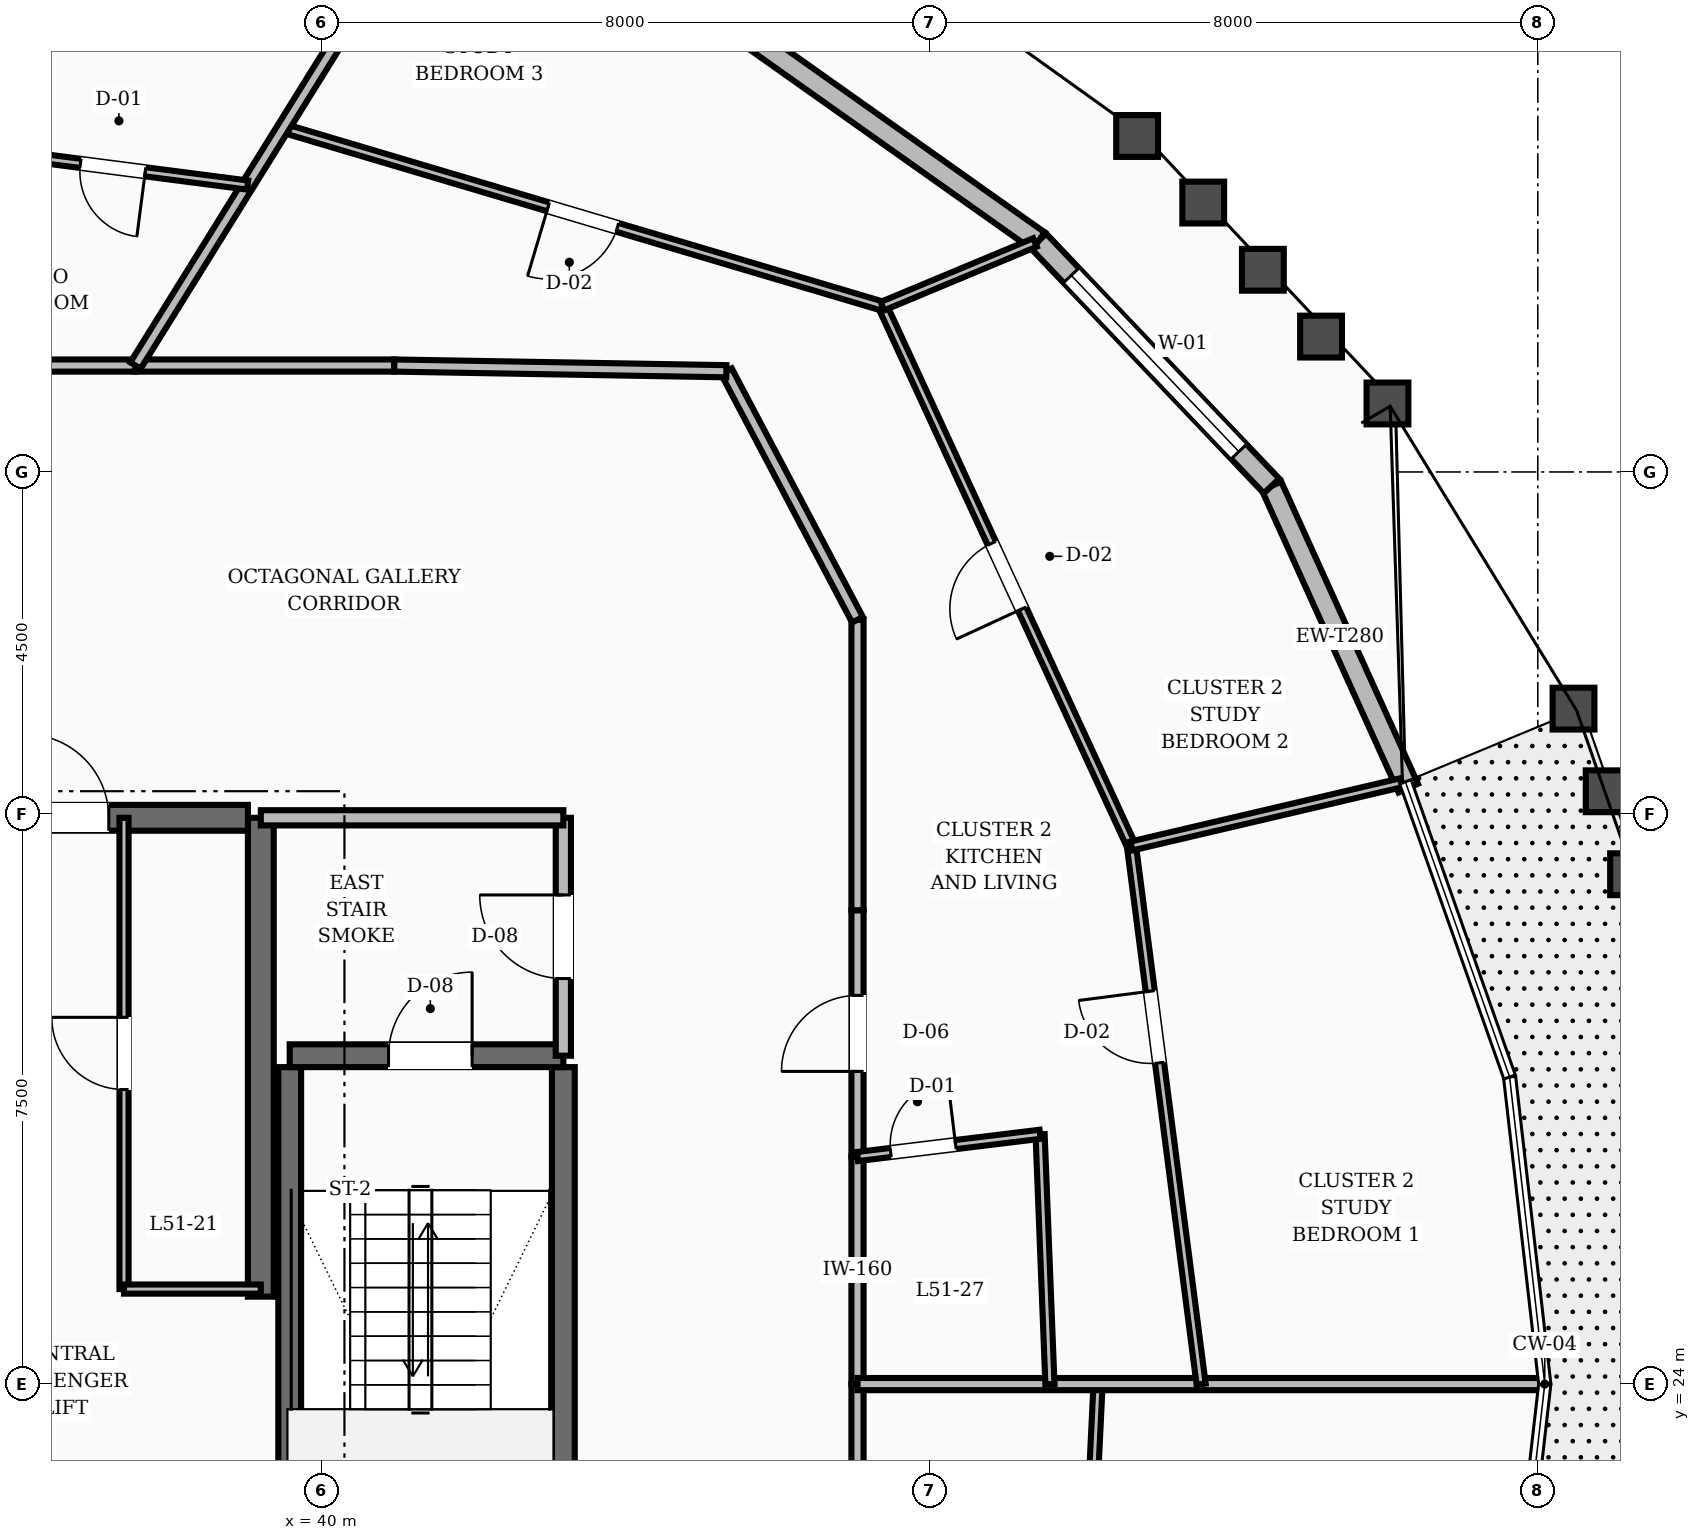
"""IFC4 building model, lengths in metres.
Left out: names, types, materials, properties, quantities, classifications, styles, units other than length and angle.
Written with IfcOpenShell. Run it as: python <this file> out.ifc"""

import sys

from ifc_helpers import new_model, si_unit, direction, frame, frame_2d, origin, place, context, subcontext, project, spatial, rectangle, extrude, element, fill, save


model = new_model("IFC4")
c1 = context("Model", 3, precision=1e-05, world=origin(), true_north=direction((0.0, 1.0)))
c2 = subcontext(c1, "Body", "Model", "MODEL_VIEW")
j1 = project(units=[si_unit("LENGTHUNIT", "METRE"), si_unit("PLANEANGLEUNIT", "RADIAN")], contexts=[c1])
p1 = place(None, origin())
s1 = spatial("IfcSite", under=j1, at=p1, CompositionType="ELEMENT")
p2 = place(p1, origin())
s2 = spatial("IfcBuilding", under=s1, at=p2, CompositionType="ELEMENT")
p3 = place(p2, frame((0.0, 0.0, 196.4)))
s3 = spatial("IfcBuildingStorey", under=s2, at=p3, CompositionType="ELEMENT", Elevation=196.4)
p4 = place(p3, frame((39.2, 25.15, 0.0), z_axis=(0.0, 0.0, 1.0), x_axis=(0.0, 1.0, 0.0)))
e1 = element("IfcWall", 1, at=p4, inside=s3, PredefinedType="SHEAR", context=c2, shape_type="SweptSolid", body=[
    extrude(rectangle(XDim=6.3, YDim=0.34, at=frame_2d((3.15, 0.0))), origin(), (0.0, 0.0, 1.0), 3.6),
])
p5 = place(p3, frame((35.8, 31.45, 0.0), z_axis=(0.0, 0.0, 1.0), x_axis=(1.0, 0.0, 0.0)))
e2 = element("IfcWall", 2, at=p5, inside=s3, PredefinedType="SHEAR", context=c2, shape_type="SweptSolid", body=[
    extrude(rectangle(XDim=3.23, YDim=0.34, at=frame_2d((1.615, 0.0))), origin(), (0.0, 0.0, 1.0), 3.6),
])
p6 = place(p5, frame((0.3, 0.0, 0.0)))
e3 = element("IfcOpeningElement", 3, at=p6, cuts=e2, PredefinedType="OPENING", context=c2, shape_type="SweptSolid", body=[
    extrude(rectangle(XDim=1.1, YDim=2.1, at=frame_2d((0.55, 1.05))), frame((0.0, 0.18, 0.0), z_axis=(0.0, -1.0, 0.0), x_axis=(1.0, 0.0, 0.0)), (0.0, 0.0, 1.0), 0.36),
])
for number, where, z_axis, x_axis in (
    (4, (43.18, 19.43, 0.0), (0.0, 0.0, 1.0), (0.0, 1.0, 0.0)),
    (5, (39.58, 19.43, 0.0), (0.0, 0.0, 1.0), (0.0, 1.0, 0.0)),
):
    element("IfcWall", number, at=place(p3, frame(where, z_axis=z_axis, x_axis=x_axis)), inside=s3, PredefinedType="SHEAR", context=c2, shape_type="SweptSolid", body=[
        extrude(rectangle(XDim=8.74, YDim=0.3, at=frame_2d((4.37, 0.0))), origin(), (0.0, 0.0, 1.0), 3.6),
    ])
p7 = place(p3, frame((39.58, 28.32, 0.0), z_axis=(0.0, 0.0, 1.0), x_axis=(1.0, 0.0, 0.0)))
e6 = element("IfcWall", 6, at=p7, inside=s3, PredefinedType="SHEAR", context=c2, shape_type="SweptSolid", body=[
    extrude(rectangle(XDim=3.6, YDim=0.3, at=frame_2d((1.8, 0.0))), origin(), (0.0, 0.0, 1.0), 3.6),
])
p8 = place(p7, frame((1.3, 0.0, 0.0)))
e7 = element("IfcOpeningElement", 7, at=p8, cuts=e6, PredefinedType="OPENING", context=c2, shape_type="SweptSolid", body=[
    extrude(rectangle(XDim=1.1, YDim=2.1, at=frame_2d((0.55, 1.05))), frame((0.0, 0.16, 0.0), z_axis=(0.0, -1.0, 0.0), x_axis=(1.0, 0.0, 0.0)), (0.0, 0.0, 1.0), 0.32),
])
p9 = place(p3, frame((54.296, 31.841, 0.0), z_axis=(0.0, 0.0, 1.0), x_axis=(-0.41225081931, 0.911070393536, 0.0)))
e8 = element("IfcWall", 8, at=p9, inside=s3, PredefinedType="STANDARD", context=c2, shape_type="SweptSolid", body=[
    extrude(rectangle(XDim=4.363, YDim=0.28, at=frame_2d((2.181, 0.0))), origin(), (0.0, 0.0, 1.0), 2.82),
])
p10 = place(p3, frame((52.497, 35.815, 0.0), z_axis=(0.0, 0.0, 1.0), x_axis=(-0.689241173538, 0.724531990115, 0.0)))
e9 = element("IfcWall", 9, at=p10, inside=s3, PredefinedType="STANDARD", context=c2, shape_type="SweptSolid", body=[
    extrude(rectangle(XDim=4.448, YDim=0.28, at=frame_2d((2.224, 0.0))), origin(), (0.0, 0.0, 1.0), 2.82),
])
p11 = place(p10, frame((0.624, 0.0, 0.8)))
e10 = element("IfcOpeningElement", 10, at=p11, cuts=e9, PredefinedType="OPENING", context=c2, shape_type="SweptSolid", body=[
    extrude(rectangle(XDim=3.2, YDim=1.65, at=frame_2d((1.6, 0.825))), frame((0.0, 0.15, 0.0), z_axis=(0.0, -1.0, 0.0), x_axis=(1.0, 0.0, 0.0)), (0.0, 0.0, 1.0), 0.3),
])
p12 = place(p3, frame((49.431, 39.038, 0.0), z_axis=(0.0, 0.0, 1.0), x_axis=(-0.81615549773, 0.577832331672, 0.0)))
e11 = element("IfcWall", 11, at=p12, inside=s3, PredefinedType="STANDARD", context=c2, shape_type="SweptSolid", body=[
    extrude(rectangle(XDim=4.577, YDim=0.28, at=frame_2d((2.289, 0.0))), origin(), (0.0, 0.0, 1.0), 2.82),
])
p13 = place(p3, frame((43.18, 28.32, 0.0), z_axis=(0.0, 0.0, 1.0), x_axis=(0.0, 1.0, 0.0)))
e12 = element("IfcWall", 12, at=p13, inside=s3, PredefinedType="SOLIDWALL", context=c2, shape_type="SweptSolid", body=[
    extrude(rectangle(XDim=3.13, YDim=0.2, at=frame_2d((1.565, 0.0))), origin(), (0.0, 0.0, 1.0), 2.8),
])
p14 = place(p13, frame((1.015, 0.0, 0.0)))
e13 = element("IfcOpeningElement", 13, at=p14, cuts=e12, PredefinedType="OPENING", context=c2, shape_type="SweptSolid", body=[
    extrude(rectangle(XDim=1.1, YDim=2.1, at=frame_2d((0.55, 1.05))), frame((0.0, 0.11, 0.0), z_axis=(0.0, -1.0, 0.0), x_axis=(1.0, 0.0, 0.0)), (0.0, 0.0, 1.0), 0.22),
])
p15 = place(p3, frame((39.2, 31.45, 0.0), z_axis=(0.0, 0.0, 1.0), x_axis=(1.0, 0.0, 0.0)))
e14 = element("IfcWall", 14, at=p15, inside=s3, PredefinedType="SOLIDWALL", context=c2, shape_type="SweptSolid", body=[
    extrude(rectangle(XDim=3.98, YDim=0.2, at=frame_2d((1.99, 0.0))), origin(), (0.0, 0.0, 1.0), 2.8),
])
p16 = place(p3, frame((37.4, 25.25, 0.0), z_axis=(0.0, 0.0, 1.0), x_axis=(0.0, 1.0, 0.0)))
e15 = element("IfcWall", 15, at=p16, inside=s3, PredefinedType="PARTITIONING", context=c2, shape_type="SweptSolid", body=[
    extrude(rectangle(XDim=6.2, YDim=0.12, at=frame_2d((3.1, 0.0))), origin(), (0.0, 0.0, 1.0), 2.8),
])
p17 = place(p16, frame((2.625, 0.0, 0.0)))
e16 = element("IfcOpeningElement", 16, at=p17, cuts=e15, PredefinedType="OPENING", context=c2, shape_type="SweptSolid", body=[
    extrude(rectangle(XDim=0.95, YDim=2.1, at=frame_2d((0.475, 1.05))), frame((0.0, 0.07, 0.0), z_axis=(0.0, -1.0, 0.0), x_axis=(1.0, 0.0, 0.0)), (0.0, 0.0, 1.0), 0.14),
])
p18 = place(p3, frame((37.4, 25.25, 0.0), z_axis=(0.0, 0.0, 1.0), x_axis=(1.0, 0.0, 0.0)))
e17 = element("IfcWall", 17, at=p18, inside=s3, PredefinedType="PARTITIONING", context=c2, shape_type="SweptSolid", body=[
    extrude(rectangle(XDim=1.8, YDim=0.12, at=frame_2d((0.9, 0.0))), origin(), (0.0, 0.0, 1.0), 2.8),
])
p19 = place(p3, frame((47.05, 24.0, 0.0), z_axis=(0.0, 0.0, 1.0), x_axis=(0.0, 1.0, 0.0)))
e18 = element("IfcWall", 18, at=p19, inside=s3, PredefinedType="SOLIDWALL", context=c2, shape_type="SweptSolid", body=[
    extrude(rectangle(XDim=2.994, YDim=0.16, at=frame_2d((1.497, 0.0))), origin(), (0.0, 0.0, 1.0), 2.8),
])
p20 = place(p3, frame((47.05, 26.994, 0.0), z_axis=(0.0, 0.0, 1.0), x_axis=(0.0, 1.0, 0.0)))
e19 = element("IfcWall", 19, at=p20, inside=s3, PredefinedType="SOLIDWALL", context=c2, shape_type="SweptSolid", body=[
    extrude(rectangle(XDim=3.24, YDim=0.16, at=frame_2d((1.62, 0.0))), origin(), (0.0, 0.0, 1.0), 2.8),
])
p21 = place(p20, frame((1.12, 0.0, 0.0)))
e20 = element("IfcOpeningElement", 20, at=p21, cuts=e19, PredefinedType="OPENING", context=c2, shape_type="SweptSolid", body=[
    extrude(rectangle(XDim=1.0, YDim=2.1, at=frame_2d((0.5, 1.05))), frame((0.0, 0.09, 0.0), z_axis=(0.0, -1.0, 0.0), x_axis=(1.0, 0.0, 0.0)), (0.0, 0.0, 1.0), 0.18),
])
p22 = place(p3, frame((47.05, 30.234, 0.0), z_axis=(0.0, 0.0, 1.0), x_axis=(0.0, 1.0, 0.0)))
e21 = element("IfcWall", 21, at=p22, inside=s3, PredefinedType="SOLIDWALL", context=c2, shape_type="SweptSolid", body=[
    extrude(rectangle(XDim=3.822, YDim=0.16, at=frame_2d((1.911, 0.0))), origin(), (0.0, 0.0, 1.0), 2.8),
])
p23 = place(p3, frame((47.05, 34.056, 0.0), z_axis=(0.0, 0.0, 1.0), x_axis=(-0.466737093093, 0.884396113702, 0.0)))
e22 = element("IfcWall", 22, at=p23, inside=s3, PredefinedType="SOLIDWALL", context=c2, shape_type="SweptSolid", body=[
    extrude(rectangle(XDim=3.696, YDim=0.16, at=frame_2d((1.848, 0.0))), origin(), (0.0, 0.0, 1.0), 2.8),
])
p24 = place(p3, frame((45.325, 37.325, 0.0), z_axis=(0.0, 0.0, 1.0), x_axis=(-0.999853038912, 0.017143528788, 0.0)))
e23 = element("IfcWall", 23, at=p24, inside=s3, PredefinedType="SOLIDWALL", context=c2, shape_type="SweptSolid", body=[
    extrude(rectangle(XDim=4.372, YDim=0.16, at=frame_2d((2.186, 0.0))), origin(), (0.0, 0.0, 1.0), 2.8),
])
p25 = place(p3, frame((40.954, 37.4, 0.0), z_axis=(0.0, 0.0, 1.0), x_axis=(-1.0, 0.0, 0.0)))
e24 = element("IfcWall", 24, at=p25, inside=s3, PredefinedType="SOLIDWALL", context=c2, shape_type="SweptSolid", body=[
    extrude(rectangle(XDim=3.403, YDim=0.16, at=frame_2d((1.702, 0.0))), origin(), (0.0, 0.0, 1.0), 2.8),
])
p26 = place(p3, frame((37.551, 37.4, 0.0), z_axis=(0.0, 0.0, 1.0), x_axis=(-1.0, 0.0, 0.0)))
e25 = element("IfcWall", 25, at=p26, inside=s3, PredefinedType="SOLIDWALL", context=c2, shape_type="SweptSolid", body=[
    extrude(rectangle(XDim=2.885, YDim=0.16, at=frame_2d((1.443, 0.0))), origin(), (0.0, 0.0, 1.0), 2.8),
])
p27 = place(p3, frame((47.05, 21.006, 0.0), z_axis=(0.0, 0.0, 1.0), x_axis=(0.0, 1.0, 0.0)))
e26 = element("IfcWall", 26, at=p27, inside=s3, PredefinedType="SOLIDWALL", context=c2, shape_type="SweptSolid", body=[
    extrude(rectangle(XDim=2.994, YDim=0.16, at=frame_2d((1.497, 0.0))), origin(), (0.0, 0.0, 1.0), 2.8),
])
p28 = place(p3, frame((50.052, 20.64, 0.0), z_axis=(0.0, 0.0, 1.0), x_axis=(0.048192738589, 0.998838054915, 0.0)))
e27 = element("IfcWall", 27, at=p28, inside=s3, PredefinedType="PARTITIONING", context=c2, shape_type="SweptSolid", body=[
    extrude(rectangle(XDim=3.364, YDim=0.12, at=frame_2d((1.682, 0.0))), origin(), (0.0, 0.0, 1.0), 2.8),
])
p29 = place(p3, frame((47.05, 24.0, 0.0), z_axis=(0.0, 0.0, 1.0), x_axis=(1.0, 0.0, 0.0)))
e28 = element("IfcWall", 28, at=p29, inside=s3, PredefinedType="SOLIDWALL", context=c2, shape_type="SweptSolid", body=[
    extrude(rectangle(XDim=8.992, YDim=0.16, at=frame_2d((4.496, 0.0))), origin(), (0.0, 0.0, 1.0), 2.8),
])
p30 = place(p3, frame((49.582, 24.0, 0.0), z_axis=(0.0, 0.0, 1.0), x_axis=(-0.03941371276, 0.999222977741, 0.0)))
e29 = element("IfcWall", 29, at=p30, inside=s3, PredefinedType="PARTITIONING", context=c2, shape_type="SweptSolid", body=[
    extrude(rectangle(XDim=3.289, YDim=0.12, at=frame_2d((1.645, 0.0))), origin(), (0.0, 0.0, 1.0), 2.8),
])
p31 = place(p3, frame((47.05, 26.994, 0.0), z_axis=(0.0, 0.0, 1.0), x_axis=(0.992644399036, 0.12106649851, 0.0)))
e30 = element("IfcWall", 30, at=p31, inside=s3, PredefinedType="PARTITIONING", context=c2, shape_type="SweptSolid", body=[
    extrude(rectangle(XDim=2.42, YDim=0.12, at=frame_2d((1.21, 0.0))), origin(), (0.0, 0.0, 1.0), 2.8),
])
p32 = place(p31, frame((0.44, 0.0, 0.0)))
e31 = element("IfcOpeningElement", 31, at=p32, cuts=e30, PredefinedType="OPENING", context=c2, shape_type="SweptSolid", body=[
    extrude(rectangle(XDim=0.86, YDim=2.1, at=frame_2d((0.43, 1.05))), frame((0.0, 0.07, 0.0), z_axis=(0.0, -1.0, 0.0), x_axis=(1.0, 0.0, 0.0)), (0.0, 0.0, 1.0), 0.14),
])
p33 = place(p3, frame((51.571, 24.0, 0.0), z_axis=(0.0, 0.0, 1.0), x_axis=(-0.128428201462, 0.991718809476, 0.0)))
e32 = element("IfcWall", 32, at=p33, inside=s3, PredefinedType="PARTITIONING", context=c2, shape_type="SweptSolid", body=[
    extrude(rectangle(XDim=7.138, YDim=0.12, at=frame_2d((3.569, 0.0))), origin(), (0.0, 0.0, 1.0), 2.8),
])
p34 = place(p33, frame((4.262, 0.0, 0.0)))
e33 = element("IfcOpeningElement", 33, at=p34, cuts=e32, PredefinedType="OPENING", context=c2, shape_type="SweptSolid", body=[
    extrude(rectangle(XDim=0.95, YDim=2.1, at=frame_2d((0.475, 1.05))), frame((0.0, 0.07, 0.0), z_axis=(0.0, -1.0, 0.0), x_axis=(1.0, 0.0, 0.0)), (0.0, 0.0, 1.0), 0.14),
])
p35 = place(p3, frame((50.654, 31.079, 0.0), z_axis=(0.0, 0.0, 1.0), x_axis=(-0.418798855395, 0.908079026693, 0.0)))
e34 = element("IfcWall", 34, at=p35, inside=s3, PredefinedType="PARTITIONING", context=c2, shape_type="SweptSolid", body=[
    extrude(rectangle(XDim=7.822, YDim=0.12, at=frame_2d((3.911, 0.0))), origin(), (0.0, 0.0, 1.0), 2.8),
])
p36 = place(p35, frame((3.436, 0.0, 0.0)))
e35 = element("IfcOpeningElement", 35, at=p36, cuts=e34, PredefinedType="OPENING", context=c2, shape_type="SweptSolid", body=[
    extrude(rectangle(XDim=0.95, YDim=2.1, at=frame_2d((0.475, 1.05))), frame((0.0, 0.07, 0.0), z_axis=(0.0, -1.0, 0.0), x_axis=(1.0, 0.0, 0.0)), (0.0, 0.0, 1.0), 0.14),
])
p37 = place(p3, frame((50.654, 31.079, 0.0), z_axis=(0.0, 0.0, 1.0), x_axis=(0.973586130085, 0.228320054542, 0.0)))
e36 = element("IfcWall", 36, at=p37, inside=s3, PredefinedType="PARTITIONING", context=c2, shape_type="SweptSolid", body=[
    extrude(rectangle(XDim=3.652, YDim=0.12, at=frame_2d((1.826, 0.0))), origin(), (0.0, 0.0, 1.0), 2.8),
])
p38 = place(p3, frame((47.378, 38.182, 0.0), z_axis=(0.0, 0.0, 1.0), x_axis=(-0.958603589204, 0.284744023231, 0.0)))
e37 = element("IfcWall", 37, at=p38, inside=s3, PredefinedType="PARTITIONING", context=c2, shape_type="SweptSolid", body=[
    extrude(rectangle(XDim=8.227, YDim=0.12, at=frame_2d((4.113, 0.0))), origin(), (0.0, 0.0, 1.0), 2.8),
])
p39 = place(p38, frame((3.638, 0.0, 0.0)))
e38 = element("IfcOpeningElement", 38, at=p39, cuts=e37, PredefinedType="OPENING", context=c2, shape_type="SweptSolid", body=[
    extrude(rectangle(XDim=0.95, YDim=2.1, at=frame_2d((0.475, 1.05))), frame((0.0, 0.07, 0.0), z_axis=(0.0, -1.0, 0.0), x_axis=(1.0, 0.0, 0.0)), (0.0, 0.0, 1.0), 0.14),
])
p40 = place(p3, frame((47.378, 38.182, 0.0), z_axis=(0.0, 0.0, 1.0), x_axis=(0.92289414644, 0.385053755296, 0.0)))
e39 = element("IfcWall", 39, at=p40, inside=s3, PredefinedType="PARTITIONING", context=c2, shape_type="SweptSolid", body=[
    extrude(rectangle(XDim=2.175, YDim=0.12, at=frame_2d((1.087, 0.0))), origin(), (0.0, 0.0, 1.0), 2.8),
])
p41 = place(p3, frame((37.551, 37.4, 0.0), z_axis=(0.0, 0.0, 1.0), x_axis=(0.527846838058, 0.849339576113, 0.0)))
e40 = element("IfcWall", 40, at=p41, inside=s3, PredefinedType="SOLIDWALL", context=c2, shape_type="SweptSolid", body=[
    extrude(rectangle(XDim=7.307, YDim=0.16, at=frame_2d((3.653, 0.0))), origin(), (0.0, 0.0, 1.0), 2.8),
])
p42 = place(p3, frame((39.026, 39.774, 0.0), z_axis=(0.0, 0.0, 1.0), x_axis=(-0.991692671257, 0.128629879012, 0.0)))
e41 = element("IfcWall", 41, at=p42, inside=s3, PredefinedType="PARTITIONING", context=c2, shape_type="SweptSolid", body=[
    extrude(rectangle(XDim=3.576, YDim=0.12, at=frame_2d((1.788, 0.0))), origin(), (0.0, 0.0, 1.0), 2.8),
])
p43 = place(p42, frame((1.358, 0.0, 0.0)))
e42 = element("IfcOpeningElement", 42, at=p43, cuts=e41, PredefinedType="OPENING", context=c2, shape_type="SweptSolid", body=[
    extrude(rectangle(XDim=0.86, YDim=2.1, at=frame_2d((0.43, 1.05))), frame((0.0, 0.07, 0.0), z_axis=(0.0, -1.0, 0.0), x_axis=(1.0, 0.0, 0.0)), (0.0, 0.0, 1.0), 0.14),
])
p44 = place(p11, origin())
e43 = element("IfcWindow", 43, at=p44, inside=s3, PartitioningType="SINGLE_PANEL", PredefinedType="WINDOW", context=c2, shape_type="SweptSolid", body=[
    extrude(rectangle(XDim=3.2, YDim=1.65, at=frame_2d((1.6, 0.825))), frame((0.0, 0.03, 0.0), z_axis=(0.0, -1.0, 0.0), x_axis=(1.0, 0.0, 0.0)), (0.0, 0.0, 1.0), 0.06),
])
fill(e10, e43)
p45 = place(p8, origin())
e44 = element("IfcDoor", 44, at=p45, inside=s3, OperationType="SINGLE_SWING_RIGHT", PredefinedType="DOOR", context=c2, shape_type="SweptSolid", body=[
    extrude(rectangle(XDim=1.1, YDim=2.1, at=frame_2d((0.55, 1.05))), frame((0.0, 0.025, 0.0), z_axis=(0.0, -1.0, 0.0), x_axis=(1.0, 0.0, 0.0)), (0.0, 0.0, 1.0), 0.05),
])
fill(e7, e44)
p46 = place(p14, origin())
e45 = element("IfcDoor", 45, at=p46, inside=s3, OperationType="SINGLE_SWING_RIGHT", PredefinedType="DOOR", context=c2, shape_type="SweptSolid", body=[
    extrude(rectangle(XDim=1.1, YDim=2.1, at=frame_2d((0.55, 1.05))), frame((0.0, 0.025, 0.0), z_axis=(0.0, -1.0, 0.0), x_axis=(1.0, 0.0, 0.0)), (0.0, 0.0, 1.0), 0.05),
])
fill(e13, e45)
p47 = place(p6, origin())
e46 = element("IfcDoor", 46, at=p47, inside=s3, OperationType="SINGLE_SWING_LEFT", PredefinedType="DOOR", context=c2, shape_type="SweptSolid", body=[
    extrude(rectangle(XDim=1.1, YDim=2.1, at=frame_2d((0.55, 1.05))), frame((0.0, 0.025, 0.0), z_axis=(0.0, -1.0, 0.0), x_axis=(1.0, 0.0, 0.0)), (0.0, 0.0, 1.0), 0.05),
])
fill(e3, e46)
p48 = place(p17, origin())
e47 = element("IfcDoor", 47, at=p48, inside=s3, OperationType="SINGLE_SWING_RIGHT", PredefinedType="DOOR", context=c2, shape_type="SweptSolid", body=[
    extrude(rectangle(XDim=0.95, YDim=2.1, at=frame_2d((0.475, 1.05))), frame((0.0, 0.025, 0.0), z_axis=(0.0, -1.0, 0.0), x_axis=(1.0, 0.0, 0.0)), (0.0, 0.0, 1.0), 0.05),
])
fill(e16, e47)
p49 = place(p32, origin())
e48 = element("IfcDoor", 48, at=p49, inside=s3, OperationType="SINGLE_SWING_RIGHT", PredefinedType="DOOR", context=c2, shape_type="SweptSolid", body=[
    extrude(rectangle(XDim=0.86, YDim=2.1, at=frame_2d((0.43, 1.05))), frame((0.0, 0.025, 0.0), z_axis=(0.0, -1.0, 0.0), x_axis=(1.0, 0.0, 0.0)), (0.0, 0.0, 1.0), 0.05),
])
fill(e31, e48)
p50 = place(p21, origin())
e49 = element("IfcDoor", 49, at=p50, inside=s3, OperationType="SINGLE_SWING_LEFT", PredefinedType="DOOR", context=c2, shape_type="SweptSolid", body=[
    extrude(rectangle(XDim=1.0, YDim=2.1, at=frame_2d((0.5, 1.05))), frame((0.0, 0.025, 0.0), z_axis=(0.0, -1.0, 0.0), x_axis=(1.0, 0.0, 0.0)), (0.0, 0.0, 1.0), 0.05),
])
fill(e20, e49)
p51 = place(p34, origin())
e50 = element("IfcDoor", 50, at=p51, inside=s3, OperationType="SINGLE_SWING_RIGHT", PredefinedType="DOOR", context=c2, shape_type="SweptSolid", body=[
    extrude(rectangle(XDim=0.95, YDim=2.1, at=frame_2d((0.475, 1.05))), frame((0.0, 0.025, 0.0), z_axis=(0.0, -1.0, 0.0), x_axis=(1.0, 0.0, 0.0)), (0.0, 0.0, 1.0), 0.05),
])
fill(e33, e50)
p52 = place(p36, origin())
e51 = element("IfcDoor", 51, at=p52, inside=s3, OperationType="SINGLE_SWING_LEFT", PredefinedType="DOOR", context=c2, shape_type="SweptSolid", body=[
    extrude(rectangle(XDim=0.95, YDim=2.1, at=frame_2d((0.475, 1.05))), frame((0.0, 0.025, 0.0), z_axis=(0.0, -1.0, 0.0), x_axis=(1.0, 0.0, 0.0)), (0.0, 0.0, 1.0), 0.05),
])
fill(e35, e51)
p53 = place(p39, origin())
e52 = element("IfcDoor", 52, at=p53, inside=s3, OperationType="SINGLE_SWING_RIGHT", PredefinedType="DOOR", context=c2, shape_type="SweptSolid", body=[
    extrude(rectangle(XDim=0.95, YDim=2.1, at=frame_2d((0.475, 1.05))), frame((0.0, 0.025, 0.0), z_axis=(0.0, -1.0, 0.0), x_axis=(1.0, 0.0, 0.0)), (0.0, 0.0, 1.0), 0.05),
])
fill(e38, e52)
p54 = place(p43, origin())
e53 = element("IfcDoor", 53, at=p54, inside=s3, OperationType="SINGLE_SWING_LEFT", PredefinedType="DOOR", context=c2, shape_type="SweptSolid", body=[
    extrude(rectangle(XDim=0.86, YDim=2.1, at=frame_2d((0.43, 1.05))), frame((0.0, 0.025, 0.0), z_axis=(0.0, -1.0, 0.0), x_axis=(1.0, 0.0, 0.0)), (0.0, 0.0, 1.0), 0.05),
])
fill(e42, e53)
save(model, sys.argv[1])
